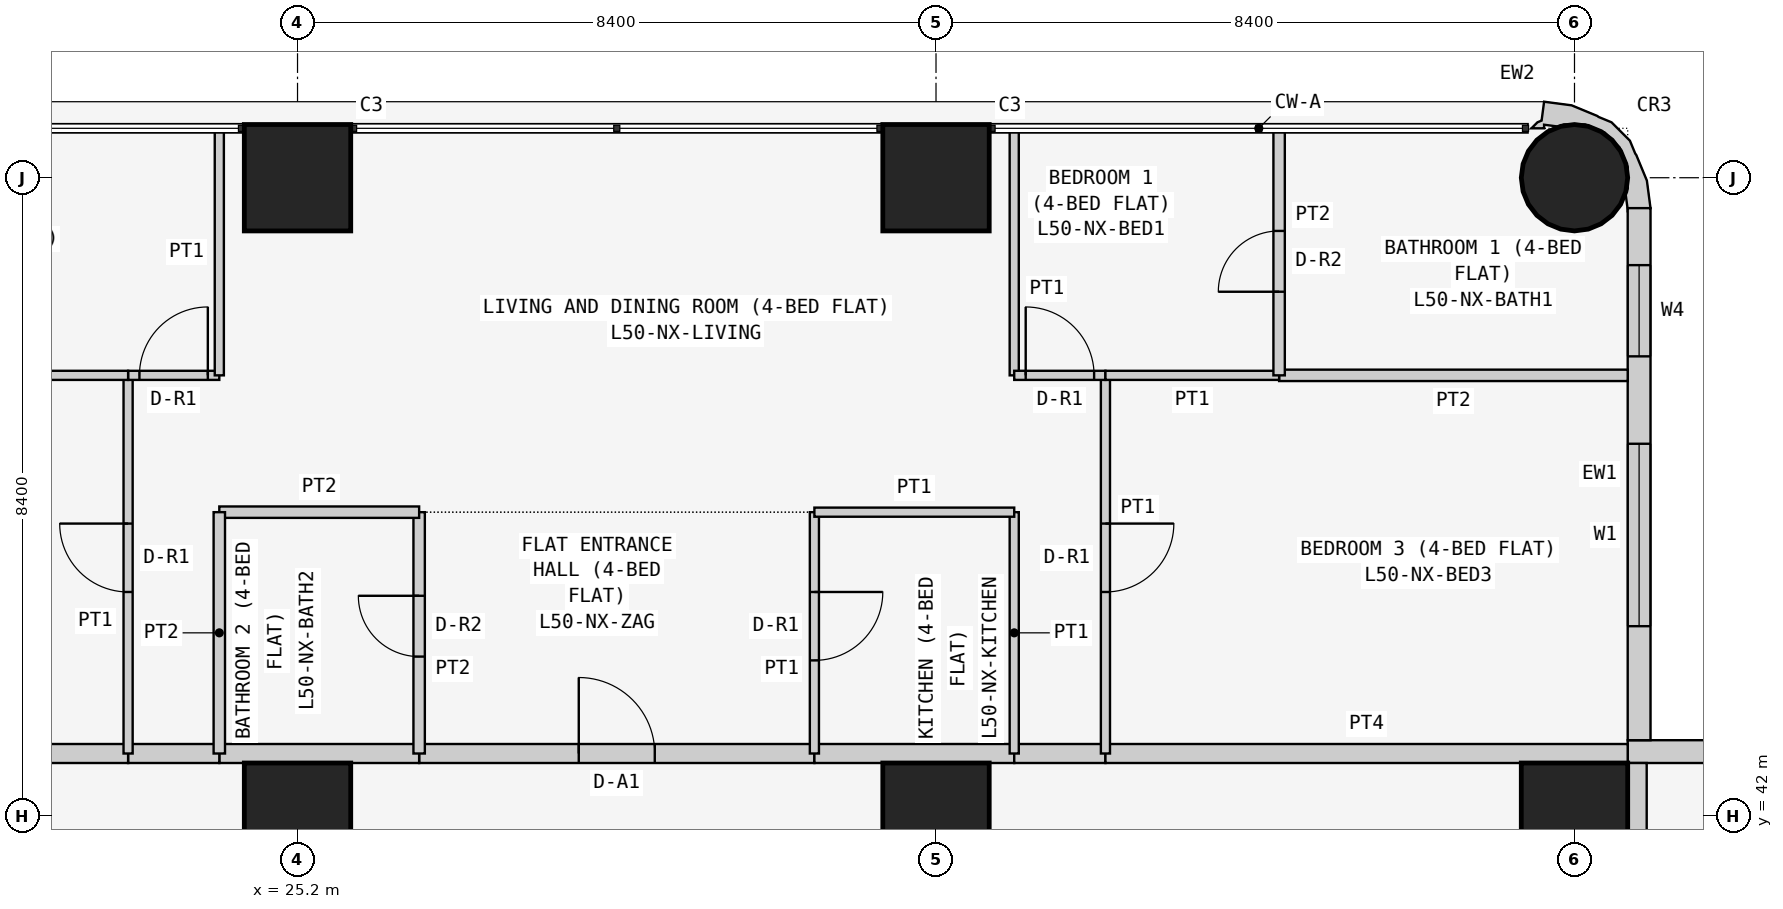
"""IFC4 building model, lengths in metres.
Left out: names, types, materials, properties, quantities, classifications, styles, units other than length and angle.
Written with IfcOpenShell. Run it as: python <this file> out.ifc"""

import sys

from ifc_helpers import new_model, si_unit, direction, frame, frame_2d, origin, origin_2d, place, context, subcontext, project, spatial, polyline, rectangle, circle, outline, extrude, element, fill, save


model = new_model("IFC4")
c1 = context("Model", 3, precision=1e-05, world=origin(), true_north=direction((0.0, 1.0)))
c2 = subcontext(c1, "Body", "Model", "MODEL_VIEW")
j1 = project(units=[si_unit("LENGTHUNIT", "METRE"), si_unit("PLANEANGLEUNIT", "RADIAN")], contexts=[c1])
p1 = place(None, origin())
s1 = spatial("IfcSite", under=j1, at=p1, CompositionType="ELEMENT")
p2 = place(p1, origin())
s2 = spatial("IfcBuilding", under=s1, at=p2, CompositionType="ELEMENT")
p3 = place(p2, frame((0.0, 0.0, 194.1)))
s3 = spatial("IfcBuildingStorey", under=s2, at=p3, CompositionType="ELEMENT", Elevation=194.1)
for number, where, z_axis, x_axis in (
    (1, (25.2, 42.0, 0.0), (0.0, 0.0, 1.0), (1.0, 0.0, 0.0)),
    (2, (25.2, 50.4, 0.0), (0.0, 0.0, 1.0), (1.0, 0.0, 0.0)),
    (3, (33.6, 42.0, 0.0), (0.0, 0.0, 1.0), (1.0, 0.0, 0.0)),
    (4, (33.6, 50.4, 0.0), (0.0, 0.0, 1.0), (1.0, 0.0, 0.0)),
    (5, (42.0, 42.0, 0.0), (0.0, 0.0, 1.0), (1.0, 0.0, 0.0)),
):
    element("IfcColumn", number, at=place(p3, frame(where, z_axis=z_axis, x_axis=x_axis)), inside=s3, PredefinedType="COLUMN", context=c2, shape_type="SweptSolid", body=[
        extrude(rectangle(XDim=1.4, YDim=1.4, at=origin_2d()), origin(), (0.0, 0.0, 1.0), 3.6),
    ])
p4 = place(p3, frame((42.0, 50.4, 0.0), z_axis=(0.0, 0.0, 1.0), x_axis=(1.0, 0.0, 0.0)))
e6 = element("IfcColumn", 6, at=p4, inside=s3, PredefinedType="COLUMN", context=c2, shape_type="SweptSolid", body=[
    extrude(circle(Radius=0.7, at=origin_2d()), origin(), (0.0, 0.0, 1.0), 3.6),
])
p5 = place(p3, frame((50.0, 42.85, 0.0), z_axis=(0.0, 0.0, 1.0), x_axis=(-1.0, 0.0, 0.0)))
e7 = element("IfcWall", 7, at=p5, inside=s3, PredefinedType="SOLIDWALL", context=c2, shape_type="SweptSolid", body=[
    extrude(rectangle(XDim=7.3, YDim=0.3, at=frame_2d((3.65, 0.0))), origin(), (0.0, 0.0, 1.0), 3.45),
])
p6 = place(p5, frame((3.1, 0.0, 0.9)))
e8 = element("IfcOpeningElement", 8, at=p6, cuts=e7, PredefinedType="OPENING", context=c2, shape_type="SweptSolid", body=[
    extrude(rectangle(XDim=2.4, YDim=1.5, at=frame_2d((1.2, 0.75))), frame((0.0, 0.16, 0.0), z_axis=(0.0, -1.0, 0.0), x_axis=(1.0, 0.0, 0.0)), (0.0, 0.0, 1.0), 0.32),
])
p7 = place(p5, frame((0.75, 0.0, 0.9)))
e9 = element("IfcOpeningElement", 9, at=p7, cuts=e7, PredefinedType="OPENING", context=c2, shape_type="SweptSolid", body=[
    extrude(rectangle(XDim=1.2, YDim=1.5, at=frame_2d((0.6, 0.75))), frame((0.0, 0.16, 0.0), z_axis=(0.0, -1.0, 0.0), x_axis=(1.0, 0.0, 0.0)), (0.0, 0.0, 1.0), 0.32),
])
p8 = place(p3, frame((42.85, 43.0, 0.0), z_axis=(0.0, 0.0, 1.0), x_axis=(0.0, 1.0, 0.0)))
e10 = element("IfcWall", 10, at=p8, inside=s3, PredefinedType="SOLIDWALL", context=c2, shape_type="SweptSolid", body=[
    extrude(rectangle(XDim=7.0, YDim=0.3, at=frame_2d((3.5, 0.0))), origin(), (0.0, 0.0, 1.0), 3.45),
])
p9 = place(p8, frame((1.5, 0.0, 0.9)))
e11 = element("IfcOpeningElement", 11, at=p9, cuts=e10, PredefinedType="OPENING", context=c2, shape_type="SweptSolid", body=[
    extrude(rectangle(XDim=2.4, YDim=1.5, at=frame_2d((1.2, 0.75))), frame((0.0, 0.16, 0.0), z_axis=(0.0, -1.0, 0.0), x_axis=(1.0, 0.0, 0.0)), (0.0, 0.0, 1.0), 0.32),
])
p10 = place(p8, frame((5.05, 0.0, 0.9)))
e12 = element("IfcOpeningElement", 12, at=p10, cuts=e10, PredefinedType="OPENING", context=c2, shape_type="SweptSolid", body=[
    extrude(rectangle(XDim=1.2, YDim=1.5, at=frame_2d((0.6, 0.75))), frame((0.0, 0.16, 0.0), z_axis=(0.0, -1.0, 0.0), x_axis=(1.0, 0.0, 0.0)), (0.0, 0.0, 1.0), 0.32),
])
p11 = place(p3, frame((42.724, 50.11, 0.0), z_axis=(0.0, 0.0, 1.0), x_axis=(0.439933741929, 0.898030234854, 0.0)))
e13 = element("IfcWall", 13, at=p11, inside=s3, PredefinedType="SOLIDWALL", context=c2, shape_type="SweptSolid", body=[
    extrude(outline(polyline([(-0.145, -0.044), (0.022, -0.296), (0.327, -0.094), (0.568, 0.18), (0.577, 0.199), (0.7, 0.337), (0.811, 0.661), (0.799, 0.845), (0.803, 0.866), (0.78, 1.231), (0.664, 1.577), (0.426, 1.497), (0.382, 1.536), (0.276, 1.572), (0.349, 1.423), (0.392, 1.444), (0.453, 1.261), (0.51, 1.211), (0.632, 0.961), (0.65, 0.683), (0.56, 0.419), (0.375, 0.21), (0.125, 0.087), (0.05, 0.082), (-0.127, -0.035), (-0.145, -0.044)])), origin(), (0.0, 0.0, 1.0), 3.45),
])
p12 = place(p3, frame((26.8, 42.825, 0.0), z_axis=(0.0, 0.0, 1.0), x_axis=(1.0, 0.0, 0.0)))
e14 = element("IfcWall", 14, at=p12, inside=s3, PredefinedType="PARTITIONING", context=c2, shape_type="SweptSolid", body=[
    extrude(rectangle(XDim=5.2, YDim=0.25, at=frame_2d((2.6, 0.0))), origin(), (0.0, 0.0, 1.0), 3.45),
])
p13 = place(p12, frame((2.1, 0.0, 0.0)))
e15 = element("IfcOpeningElement", 15, at=p13, cuts=e14, PredefinedType="OPENING", context=c2, shape_type="SweptSolid", body=[
    extrude(rectangle(XDim=1.0, YDim=2.1, at=frame_2d((0.5, 1.05))), frame((0.0, 0.135, 0.0), z_axis=(0.0, -1.0, 0.0), x_axis=(1.0, 0.0, 0.0)), (0.0, 0.0, 1.0), 0.27),
])
p14 = place(p3, frame((24.171, 42.825, 0.0), z_axis=(0.0, 0.0, 1.0), x_axis=(1.0, 0.0, 0.0)))
e16 = element("IfcWall", 16, at=p14, inside=s3, PredefinedType="PARTITIONING", context=c2, shape_type="SweptSolid", body=[
    extrude(rectangle(XDim=2.629, YDim=0.25, at=frame_2d((1.314, 0.0))), origin(), (0.0, 0.0, 1.0), 3.45),
])
p15 = place(p3, frame((32.0, 42.825, 0.0), z_axis=(0.0, 0.0, 1.0), x_axis=(1.0, 0.0, 0.0)))
e17 = element("IfcWall", 17, at=p15, inside=s3, PredefinedType="PARTITIONING", context=c2, shape_type="SweptSolid", body=[
    extrude(rectangle(XDim=2.629, YDim=0.25, at=frame_2d((1.314, 0.0))), origin(), (0.0, 0.0, 1.0), 3.45),
])
p16 = place(p3, frame((22.971, 42.825, 0.0), z_axis=(0.0, 0.0, 1.0), x_axis=(1.0, 0.0, 0.0)))
e18 = element("IfcWall", 18, at=p16, inside=s3, PredefinedType="PARTITIONING", context=c2, shape_type="SweptSolid", body=[
    extrude(rectangle(XDim=1.2, YDim=0.25, at=frame_2d((0.6, 0.0))), origin(), (0.0, 0.0, 1.0), 3.45),
])
p17 = place(p3, frame((34.629, 42.825, 0.0), z_axis=(0.0, 0.0, 1.0), x_axis=(1.0, 0.0, 0.0)))
e19 = element("IfcWall", 19, at=p17, inside=s3, PredefinedType="PARTITIONING", context=c2, shape_type="SweptSolid", body=[
    extrude(rectangle(XDim=1.2, YDim=0.25, at=frame_2d((0.6, 0.0))), origin(), (0.0, 0.0, 1.0), 3.45),
])
for number, where, z_axis, x_axis in (
    (20, (16.1, 42.825, 0.0), (0.0, 0.0, 1.0), (1.0, 0.0, 0.0)),
    (21, (35.829, 42.825, 0.0), (0.0, 0.0, 1.0), (1.0, 0.0, 0.0)),
    (22, (42.825, 42.7, 0.0), (0.0, 0.0, 1.0), (0.0, -1.0, 0.0)),
):
    element("IfcWall", number, at=place(p3, frame(where, z_axis=z_axis, x_axis=x_axis)), inside=s3, PredefinedType="PARTITIONING", context=c2, shape_type="SweptSolid", body=[
        extrude(rectangle(XDim=6.871, YDim=0.25, at=frame_2d((3.436, 0.0))), origin(), (0.0, 0.0, 1.0), 3.45),
    ])
p18 = place(p3, frame((26.8, 46.0, 0.0), z_axis=(0.0, 0.0, 1.0), x_axis=(0.0, -1.0, 0.0)))
e23 = element("IfcWall", 23, at=p18, inside=s3, PredefinedType="PARTITIONING", context=c2, shape_type="SweptSolid", body=[
    extrude(rectangle(XDim=3.175, YDim=0.15, at=frame_2d((1.587, 0.0))), origin(), (0.0, 0.0, 1.0), 3.45),
])
p19 = place(p18, frame((1.1, 0.0, 0.0)))
e24 = element("IfcOpeningElement", 24, at=p19, cuts=e23, PredefinedType="OPENING", context=c2, shape_type="SweptSolid", body=[
    extrude(rectangle(XDim=0.8, YDim=2.1, at=frame_2d((0.4, 1.05))), frame((0.0, 0.085, 0.0), z_axis=(0.0, -1.0, 0.0), x_axis=(1.0, 0.0, 0.0)), (0.0, 0.0, 1.0), 0.17),
])
p20 = place(p3, frame((32.0, 42.825, 0.0), z_axis=(0.0, 0.0, 1.0), x_axis=(0.0, 1.0, 0.0)))
e25 = element("IfcWall", 25, at=p20, inside=s3, PredefinedType="PARTITIONING", context=c2, shape_type="SweptSolid", body=[
    extrude(rectangle(XDim=3.175, YDim=0.12, at=frame_2d((1.587, 0.0))), origin(), (0.0, 0.0, 1.0), 3.45),
])
p21 = place(p20, frame((1.225, 0.0, 0.0)))
e26 = element("IfcOpeningElement", 26, at=p21, cuts=e25, PredefinedType="OPENING", context=c2, shape_type="SweptSolid", body=[
    extrude(rectangle(XDim=0.9, YDim=2.1, at=frame_2d((0.45, 1.05))), frame((0.0, 0.07, 0.0), z_axis=(0.0, -1.0, 0.0), x_axis=(1.0, 0.0, 0.0)), (0.0, 0.0, 1.0), 0.14),
])
p22 = place(p3, frame((26.8, 46.0, 0.0), z_axis=(0.0, 0.0, 1.0), x_axis=(-1.0, 0.0, 0.0)))
e27 = element("IfcWall", 27, at=p22, inside=s3, PredefinedType="PARTITIONING", context=c2, shape_type="SweptSolid", body=[
    extrude(rectangle(XDim=2.629, YDim=0.15, at=frame_2d((1.314, 0.0))), origin(), (0.0, 0.0, 1.0), 3.45),
])
p23 = place(p3, frame((24.171, 46.0, 0.0), z_axis=(0.0, 0.0, 1.0), x_axis=(0.0, -1.0, 0.0)))
e28 = element("IfcWall", 28, at=p23, inside=s3, PredefinedType="PARTITIONING", context=c2, shape_type="SweptSolid", body=[
    extrude(rectangle(XDim=3.175, YDim=0.15, at=frame_2d((1.587, 0.0))), origin(), (0.0, 0.0, 1.0), 3.45),
])
p24 = place(p3, frame((34.629, 42.825, 0.0), z_axis=(0.0, 0.0, 1.0), x_axis=(0.0, 1.0, 0.0)))
e29 = element("IfcWall", 29, at=p24, inside=s3, PredefinedType="PARTITIONING", context=c2, shape_type="SweptSolid", body=[
    extrude(rectangle(XDim=3.175, YDim=0.12, at=frame_2d((1.587, 0.0))), origin(), (0.0, 0.0, 1.0), 3.45),
])
p25 = place(p3, frame((34.629, 46.0, 0.0), z_axis=(0.0, 0.0, 1.0), x_axis=(-1.0, 0.0, 0.0)))
e30 = element("IfcWall", 30, at=p25, inside=s3, PredefinedType="PARTITIONING", context=c2, shape_type="SweptSolid", body=[
    extrude(rectangle(XDim=2.629, YDim=0.12, at=frame_2d((1.314, 0.0))), origin(), (0.0, 0.0, 1.0), 3.45),
])
p26 = place(p3, frame((22.971, 42.825, 0.0), z_axis=(0.0, 0.0, 1.0), x_axis=(0.0, 1.0, 0.0)))
e31 = element("IfcWall", 31, at=p26, inside=s3, PredefinedType="PARTITIONING", context=c2, shape_type="SweptSolid", body=[
    extrude(rectangle(XDim=4.975, YDim=0.12, at=frame_2d((2.488, 0.0))), origin(), (0.0, 0.0, 1.0), 3.45),
])
p27 = place(p26, frame((2.125, 0.0, 0.0)))
e32 = element("IfcOpeningElement", 32, at=p27, cuts=e31, PredefinedType="OPENING", context=c2, shape_type="SweptSolid", body=[
    extrude(rectangle(XDim=0.9, YDim=2.1, at=frame_2d((0.45, 1.05))), frame((0.0, 0.07, 0.0), z_axis=(0.0, -1.0, 0.0), x_axis=(1.0, 0.0, 0.0)), (0.0, 0.0, 1.0), 0.14),
])
p28 = place(p3, frame((22.971, 47.8, 0.0), z_axis=(0.0, 0.0, 1.0), x_axis=(1.0, 0.0, 0.0)))
e33 = element("IfcWall", 33, at=p28, inside=s3, PredefinedType="PARTITIONING", context=c2, shape_type="SweptSolid", body=[
    extrude(rectangle(XDim=1.2, YDim=0.12, at=frame_2d((0.6, 0.0))), origin(), (0.0, 0.0, 1.0), 3.45),
])
p29 = place(p28, frame((0.149, 0.0, 0.0)))
e34 = element("IfcOpeningElement", 34, at=p29, cuts=e33, PredefinedType="OPENING", context=c2, shape_type="SweptSolid", body=[
    extrude(rectangle(XDim=0.9, YDim=2.1, at=frame_2d((0.45, 1.05))), frame((0.0, 0.07, 0.0), z_axis=(0.0, -1.0, 0.0), x_axis=(1.0, 0.0, 0.0)), (0.0, 0.0, 1.0), 0.14),
])
p30 = place(p3, frame((24.171, 47.8, 0.0), z_axis=(0.0, 0.0, 1.0), x_axis=(0.0, 1.0, 0.0)))
e35 = element("IfcWall", 35, at=p30, inside=s3, PredefinedType="PARTITIONING", context=c2, shape_type="SweptSolid", body=[
    extrude(rectangle(XDim=3.25, YDim=0.12, at=frame_2d((1.625, 0.0))), origin(), (0.0, 0.0, 1.0), 3.45),
])
p31 = place(p3, frame((35.829, 47.8, 0.0), z_axis=(0.0, 0.0, 1.0), x_axis=(0.0, -1.0, 0.0)))
e36 = element("IfcWall", 36, at=p31, inside=s3, PredefinedType="PARTITIONING", context=c2, shape_type="SweptSolid", body=[
    extrude(rectangle(XDim=4.975, YDim=0.12, at=frame_2d((2.488, 0.0))), origin(), (0.0, 0.0, 1.0), 3.45),
])
p32 = place(p31, frame((1.95, 0.0, 0.0)))
e37 = element("IfcOpeningElement", 37, at=p32, cuts=e36, PredefinedType="OPENING", context=c2, shape_type="SweptSolid", body=[
    extrude(rectangle(XDim=0.9, YDim=2.1, at=frame_2d((0.45, 1.05))), frame((0.0, 0.07, 0.0), z_axis=(0.0, -1.0, 0.0), x_axis=(1.0, 0.0, 0.0)), (0.0, 0.0, 1.0), 0.14),
])
p33 = place(p3, frame((34.629, 51.05, 0.0), z_axis=(0.0, 0.0, 1.0), x_axis=(0.0, -1.0, 0.0)))
e38 = element("IfcWall", 38, at=p33, inside=s3, PredefinedType="PARTITIONING", context=c2, shape_type="SweptSolid", body=[
    extrude(rectangle(XDim=3.25, YDim=0.12, at=frame_2d((1.625, 0.0))), origin(), (0.0, 0.0, 1.0), 3.45),
])
p34 = place(p3, frame((34.629, 47.8, 0.0), z_axis=(0.0, 0.0, 1.0), x_axis=(1.0, 0.0, 0.0)))
e39 = element("IfcWall", 39, at=p34, inside=s3, PredefinedType="PARTITIONING", context=c2, shape_type="SweptSolid", body=[
    extrude(rectangle(XDim=1.2, YDim=0.12, at=frame_2d((0.6, 0.0))), origin(), (0.0, 0.0, 1.0), 3.45),
])
p35 = place(p34, frame((0.151, 0.0, 0.0)))
e40 = element("IfcOpeningElement", 40, at=p35, cuts=e39, PredefinedType="OPENING", context=c2, shape_type="SweptSolid", body=[
    extrude(rectangle(XDim=0.9, YDim=2.1, at=frame_2d((0.45, 1.05))), frame((0.0, 0.07, 0.0), z_axis=(0.0, -1.0, 0.0), x_axis=(1.0, 0.0, 0.0)), (0.0, 0.0, 1.0), 0.14),
])
p36 = place(p3, frame((22.971, 47.8, 0.0), z_axis=(0.0, 0.0, 1.0), x_axis=(-1.0, 0.0, 0.0)))
e41 = element("IfcWall", 41, at=p36, inside=s3, PredefinedType="PARTITIONING", context=c2, shape_type="SweptSolid", body=[
    extrude(rectangle(XDim=6.871, YDim=0.12, at=frame_2d((3.436, 0.0))), origin(), (0.0, 0.0, 1.0), 3.45),
])
p37 = place(p3, frame((42.7, 47.8, 0.0), z_axis=(0.0, 0.0, 1.0), x_axis=(-1.0, 0.0, 0.0)))
e42 = element("IfcWall", 42, at=p37, inside=s3, PredefinedType="PARTITIONING", context=c2, shape_type="SweptSolid", body=[
    extrude(rectangle(XDim=4.586, YDim=0.15, at=frame_2d((2.293, 0.0))), origin(), (0.0, 0.0, 1.0), 3.45),
])
p38 = place(p3, frame((38.114, 47.8, 0.0), z_axis=(0.0, 0.0, 1.0), x_axis=(-1.0, 0.0, 0.0)))
e43 = element("IfcWall", 43, at=p38, inside=s3, PredefinedType="PARTITIONING", context=c2, shape_type="SweptSolid", body=[
    extrude(rectangle(XDim=2.285, YDim=0.12, at=frame_2d((1.143, 0.0))), origin(), (0.0, 0.0, 1.0), 3.45),
])
p39 = place(p3, frame((38.114, 51.05, 0.0), z_axis=(0.0, 0.0, 1.0), x_axis=(0.0, -1.0, 0.0)))
e44 = element("IfcWall", 44, at=p39, inside=s3, PredefinedType="PARTITIONING", context=c2, shape_type="SweptSolid", body=[
    extrude(rectangle(XDim=3.25, YDim=0.15, at=frame_2d((1.625, 0.0))), origin(), (0.0, 0.0, 1.0), 3.45),
])
p40 = place(p39, frame((1.35, 0.0, 0.0)))
e45 = element("IfcOpeningElement", 45, at=p40, cuts=e44, PredefinedType="OPENING", context=c2, shape_type="SweptSolid", body=[
    extrude(rectangle(XDim=0.8, YDim=2.1, at=frame_2d((0.4, 1.05))), frame((0.0, 0.085, 0.0), z_axis=(0.0, -1.0, 0.0), x_axis=(1.0, 0.0, 0.0)), (0.0, 0.0, 1.0), 0.17),
])
p41 = place(p9, origin())
e46 = element("IfcWindow", 46, at=p41, inside=s3, PartitioningType="SINGLE_PANEL", PredefinedType="WINDOW", context=c2, shape_type="SweptSolid", body=[
    extrude(rectangle(XDim=2.4, YDim=1.5, at=frame_2d((1.2, 0.75))), frame((0.0, 0.03, 0.0), z_axis=(0.0, -1.0, 0.0), x_axis=(1.0, 0.0, 0.0)), (0.0, 0.0, 1.0), 0.06),
])
fill(e11, e46)
p42 = place(p10, origin())
e47 = element("IfcWindow", 47, at=p42, inside=s3, PartitioningType="SINGLE_PANEL", PredefinedType="WINDOW", context=c2, shape_type="SweptSolid", body=[
    extrude(rectangle(XDim=1.2, YDim=1.5, at=frame_2d((0.6, 0.75))), frame((0.0, 0.03, 0.0), z_axis=(0.0, -1.0, 0.0), x_axis=(1.0, 0.0, 0.0)), (0.0, 0.0, 1.0), 0.06),
])
fill(e12, e47)
p43 = place(p13, origin())
e48 = element("IfcDoor", 48, at=p43, inside=s3, OperationType="SINGLE_SWING_LEFT", PredefinedType="DOOR", context=c2, shape_type="SweptSolid", body=[
    extrude(rectangle(XDim=1.0, YDim=2.1, at=frame_2d((0.5, 1.05))), frame((0.0, 0.025, 0.0), z_axis=(0.0, -1.0, 0.0), x_axis=(1.0, 0.0, 0.0)), (0.0, 0.0, 1.0), 0.05),
])
fill(e15, e48)
p44 = place(p19, frame((0.8, 0.0, 0.0), z_axis=(0.0, 0.0, 1.0), x_axis=(-1.0, 0.0, 0.0)))
e49 = element("IfcDoor", 49, at=p44, inside=s3, OperationType="SINGLE_SWING_RIGHT", PredefinedType="DOOR", context=c2, shape_type="SweptSolid", body=[
    extrude(rectangle(XDim=0.8, YDim=2.1, at=frame_2d((0.4, 1.05))), frame((0.0, 0.025, 0.0), z_axis=(0.0, -1.0, 0.0), x_axis=(1.0, 0.0, 0.0)), (0.0, 0.0, 1.0), 0.05),
])
fill(e24, e49)
p45 = place(p21, frame((0.9, 0.0, 0.0), z_axis=(0.0, 0.0, 1.0), x_axis=(-1.0, 0.0, 0.0)))
e50 = element("IfcDoor", 50, at=p45, inside=s3, OperationType="SINGLE_SWING_LEFT", PredefinedType="DOOR", context=c2, shape_type="SweptSolid", body=[
    extrude(rectangle(XDim=0.9, YDim=2.1, at=frame_2d((0.45, 1.05))), frame((0.0, 0.025, 0.0), z_axis=(0.0, -1.0, 0.0), x_axis=(1.0, 0.0, 0.0)), (0.0, 0.0, 1.0), 0.05),
])
fill(e26, e50)
p46 = place(p27, origin())
e51 = element("IfcDoor", 51, at=p46, inside=s3, OperationType="SINGLE_SWING_RIGHT", PredefinedType="DOOR", context=c2, shape_type="SweptSolid", body=[
    extrude(rectangle(XDim=0.9, YDim=2.1, at=frame_2d((0.45, 1.05))), frame((0.0, 0.025, 0.0), z_axis=(0.0, -1.0, 0.0), x_axis=(1.0, 0.0, 0.0)), (0.0, 0.0, 1.0), 0.05),
])
fill(e32, e51)
p47 = place(p29, origin())
e52 = element("IfcDoor", 52, at=p47, inside=s3, OperationType="SINGLE_SWING_RIGHT", PredefinedType="DOOR", context=c2, shape_type="SweptSolid", body=[
    extrude(rectangle(XDim=0.9, YDim=2.1, at=frame_2d((0.45, 1.05))), frame((0.0, 0.025, 0.0), z_axis=(0.0, -1.0, 0.0), x_axis=(1.0, 0.0, 0.0)), (0.0, 0.0, 1.0), 0.05),
])
fill(e34, e52)
p48 = place(p32, origin())
e53 = element("IfcDoor", 53, at=p48, inside=s3, OperationType="SINGLE_SWING_LEFT", PredefinedType="DOOR", context=c2, shape_type="SweptSolid", body=[
    extrude(rectangle(XDim=0.9, YDim=2.1, at=frame_2d((0.45, 1.05))), frame((0.0, 0.025, 0.0), z_axis=(0.0, -1.0, 0.0), x_axis=(1.0, 0.0, 0.0)), (0.0, 0.0, 1.0), 0.05),
])
fill(e37, e53)
p49 = place(p35, origin())
e54 = element("IfcDoor", 54, at=p49, inside=s3, OperationType="SINGLE_SWING_LEFT", PredefinedType="DOOR", context=c2, shape_type="SweptSolid", body=[
    extrude(rectangle(XDim=0.9, YDim=2.1, at=frame_2d((0.45, 1.05))), frame((0.0, 0.025, 0.0), z_axis=(0.0, -1.0, 0.0), x_axis=(1.0, 0.0, 0.0)), (0.0, 0.0, 1.0), 0.05),
])
fill(e40, e54)
p50 = place(p40, frame((0.8, 0.0, 0.0), z_axis=(0.0, 0.0, 1.0), x_axis=(-1.0, 0.0, 0.0)))
e55 = element("IfcDoor", 55, at=p50, inside=s3, OperationType="SINGLE_SWING_LEFT", PredefinedType="DOOR", context=c2, shape_type="SweptSolid", body=[
    extrude(rectangle(XDim=0.8, YDim=2.1, at=frame_2d((0.4, 1.05))), frame((0.0, 0.025, 0.0), z_axis=(0.0, -1.0, 0.0), x_axis=(1.0, 0.0, 0.0)), (0.0, 0.0, 1.0), 0.05),
])
fill(e45, e55)
save(model, sys.argv[1])
